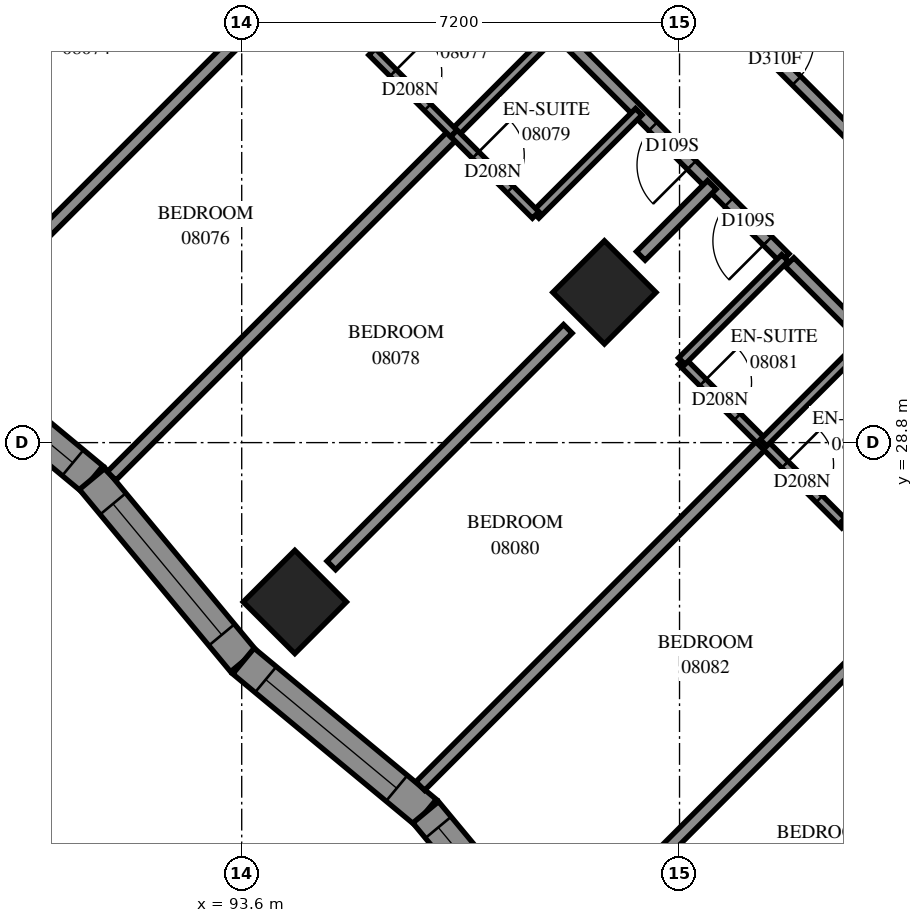
"""IFC4 building model, lengths in metres.
Left out: names, types, materials, properties, quantities, classifications, styles, units other than length and angle.
Written with IfcOpenShell. Run it as: python <this file> out.ifc"""

import sys

from ifc_helpers import new_model, si_unit, direction, frame, frame_2d, origin, origin_2d, place, context, subcontext, project, spatial, polyline, rectangle, outline, extrude, element, fill, save


model = new_model("IFC4")
c1 = context("Model", 3, precision=1e-05, world=origin(), true_north=direction((0.0, 1.0)))
c2 = subcontext(c1, "Body", "Model", "MODEL_VIEW")
j1 = project(units=[si_unit("LENGTHUNIT", "METRE"), si_unit("PLANEANGLEUNIT", "RADIAN")], contexts=[c1])
p1 = place(None, origin())
s1 = spatial("IfcSite", under=j1, at=p1, CompositionType="ELEMENT")
p2 = place(p1, origin())
s2 = spatial("IfcBuilding", under=s1, at=p2, CompositionType="ELEMENT")
p3 = place(p2, frame((0.0, 0.0, 33.8)))
s3 = spatial("IfcBuildingStorey", under=s2, at=p3, CompositionType="ELEMENT", Elevation=33.8)
for number, where, z_axis, x_axis in (
    (1, (99.565, 31.271, 0.0), (0.0, 0.0, 1.0), (0.707, -0.707, 0.0)),
    (2, (94.474, 26.18, 0.0), (0.0, 0.0, 1.0), (0.707, -0.707, 0.0)),
):
    element("IfcColumn", number, at=place(p3, frame(where, z_axis=z_axis, x_axis=x_axis)), inside=s3, PredefinedType="COLUMN", context=c2, shape_type="SweptSolid", body=[
        extrude(rectangle(XDim=1.2, YDim=1.2, at=origin_2d()), origin(), (0.0, 0.0, 1.0), 3.1),
    ])
p4 = place(p3, frame((88.145, 30.691, 0.0), z_axis=(0.0, 0.0, 1.0), x_axis=(0.7696065296, -0.6385184333, 0.0)))
e3 = element("IfcWall", 3, at=p4, inside=s3, PredefinedType="SOLIDWALL", context=c2, shape_type="SweptSolid", body=[
    extrude(outline(polyline([(-0.026, -0.275), (3.869, -0.275), (3.92, 0.275), (0.026, 0.275), (-0.026, -0.275)])), origin(), (0.0, 0.0, 1.0), 3.1),
])
p5 = place(p4, frame((0.681, 0.0, 0.5)))
e4 = element("IfcOpeningElement", 4, at=p5, cuts=e3, PredefinedType="OPENING", context=c2, shape_type="SweptSolid", body=[
    extrude(rectangle(XDim=2.8, YDim=2.45, at=frame_2d((1.4, 1.225))), frame((0.0, 0.285, 0.0), z_axis=(0.0, -1.0, 0.0), x_axis=(1.0, 0.0, 0.0)), (0.0, 0.0, 1.0), 0.57),
])
p6 = place(p3, frame((91.142, 28.205, 0.0), z_axis=(0.0, 0.0, 1.0), x_axis=(0.6385184333, -0.7696065296, 0.0)))
e5 = element("IfcWall", 5, at=p6, inside=s3, PredefinedType="SOLIDWALL", context=c2, shape_type="SweptSolid", body=[
    extrude(outline(polyline([(0.026, -0.275), (3.92, -0.275), (3.869, 0.275), (-0.026, 0.275), (0.026, -0.275)])), origin(), (0.0, 0.0, 1.0), 3.1),
])
p7 = place(p6, frame((0.534, 0.0, 0.5)))
e6 = element("IfcOpeningElement", 6, at=p7, cuts=e5, PredefinedType="OPENING", context=c2, shape_type="SweptSolid", body=[
    extrude(rectangle(XDim=2.8, YDim=2.45, at=frame_2d((1.4, 1.225))), frame((0.0, 0.285, 0.0), z_axis=(0.0, -1.0, 0.0), x_axis=(1.0, 0.0, 0.0)), (0.0, 0.0, 1.0), 0.57),
])
p8 = place(p3, frame((93.629, 25.207, 0.0), z_axis=(0.0, 0.0, 1.0), x_axis=(0.7696065296, -0.6385184333, 0.0)))
e7 = element("IfcWall", 7, at=p8, inside=s3, PredefinedType="SOLIDWALL", context=c2, shape_type="SweptSolid", body=[
    extrude(outline(polyline([(-0.026, -0.275), (3.869, -0.275), (3.92, 0.275), (0.026, 0.275), (-0.026, -0.275)])), origin(), (0.0, 0.0, 1.0), 3.1),
])
p9 = place(p8, frame((0.475, 0.0, 0.5)))
e8 = element("IfcOpeningElement", 8, at=p9, cuts=e7, PredefinedType="OPENING", context=c2, shape_type="SweptSolid", body=[
    extrude(rectangle(XDim=2.8, YDim=2.45, at=frame_2d((1.4, 1.225))), frame((0.0, 0.285, 0.0), z_axis=(0.0, -1.0, 0.0), x_axis=(1.0, 0.0, 0.0)), (0.0, 0.0, 1.0), 0.57),
])
p10 = place(p3, frame((96.626, 22.721, 0.0), z_axis=(0.0, 0.0, 1.0), x_axis=(0.6385032238, -0.7696191482, 0.0)))
e9 = element("IfcWall", 9, at=p10, inside=s3, PredefinedType="SOLIDWALL", context=c2, shape_type="SweptSolid", body=[
    extrude(outline(polyline([(0.026, -0.275), (3.92, -0.275), (3.869, 0.275), (-0.026, 0.275), (0.026, -0.275)])), origin(), (0.0, 0.0, 1.0), 3.1),
])
p11 = place(p10, frame((0.323, 0.0, 0.5)))
e10 = element("IfcOpeningElement", 10, at=p11, cuts=e9, PredefinedType="OPENING", context=c2, shape_type="SweptSolid", body=[
    extrude(rectangle(XDim=2.8, YDim=2.45, at=frame_2d((1.4, 1.225))), frame((0.0, 0.285, 0.0), z_axis=(0.0, -1.0, 0.0), x_axis=(1.0, 0.0, 0.0)), (0.0, 0.0, 1.0), 0.57),
])
p12 = place(p3, frame((94.895, 42.581, 0.0), z_axis=(0.0, 0.0, 1.0), x_axis=(0.7071067812, -0.7071067812, 0.0)))
e11 = element("IfcWall", 11, at=p12, inside=s3, PredefinedType="PARTITIONING", context=c2, shape_type="SweptSolid", body=[
    extrude(rectangle(XDim=14.9, YDim=0.2, at=frame_2d((7.45, 0.0))), origin(), (0.0, 0.0, 1.0), 3.1),
])
p13 = place(p12, frame((2.8, 0.0, 0.0)))
e12 = element("IfcOpeningElement", 12, at=p13, cuts=e11, PredefinedType="OPENING", context=c2, shape_type="SweptSolid", body=[
    extrude(rectangle(XDim=0.9, YDim=2.1, at=frame_2d((0.45, 1.05))), frame((0.0, 0.11, 0.0), z_axis=(0.0, -1.0, 0.0), x_axis=(1.0, 0.0, 0.0)), (0.0, 0.0, 1.0), 0.22),
])
p14 = place(p12, frame((4.348, 0.0, 0.0)))
e13 = element("IfcOpeningElement", 13, at=p14, cuts=e11, PredefinedType="OPENING", context=c2, shape_type="SweptSolid", body=[
    extrude(rectangle(XDim=0.9, YDim=2.1, at=frame_2d((0.45, 1.05))), frame((0.0, 0.11, 0.0), z_axis=(0.0, -1.0, 0.0), x_axis=(1.0, 0.0, 0.0)), (0.0, 0.0, 1.0), 0.22),
])
p15 = place(p12, frame((10.073, 0.0, 0.0)))
e14 = element("IfcOpeningElement", 14, at=p15, cuts=e11, PredefinedType="OPENING", context=c2, shape_type="SweptSolid", body=[
    extrude(rectangle(XDim=1.0, YDim=2.1, at=frame_2d((0.5, 1.05))), frame((0.0, 0.11, 0.0), z_axis=(0.0, -1.0, 0.0), x_axis=(1.0, 0.0, 0.0)), (0.0, 0.0, 1.0), 0.22),
])
p16 = place(p3, frame((102.609, 31.769, 0.0), z_axis=(0.0, 0.0, 1.0), x_axis=(0.7071067812, -0.7071067812, 0.0)))
e15 = element("IfcWall", 15, at=p16, inside=s3, PredefinedType="PARTITIONING", context=c2, shape_type="SweptSolid", body=[
    extrude(rectangle(XDim=10.723, YDim=0.2, at=frame_2d((5.361, 0.0))), origin(), (0.0, 0.0, 1.0), 3.1),
])
p17 = place(p16, frame((4.15, 0.0, 0.0)))
e16 = element("IfcOpeningElement", 16, at=p17, cuts=e15, PredefinedType="OPENING", context=c2, shape_type="SweptSolid", body=[
    extrude(rectangle(XDim=0.9, YDim=2.1, at=frame_2d((0.45, 1.05))), frame((0.0, 0.11, 0.0), z_axis=(0.0, -1.0, 0.0), x_axis=(1.0, 0.0, 0.0)), (0.0, 0.0, 1.0), 0.22),
])
p18 = place(p16, frame((5.8, 0.0, 0.0)))
e17 = element("IfcOpeningElement", 17, at=p18, cuts=e15, PredefinedType="OPENING", context=c2, shape_type="SweptSolid", body=[
    extrude(rectangle(XDim=0.9, YDim=2.1, at=frame_2d((0.45, 1.05))), frame((0.0, 0.11, 0.0), z_axis=(0.0, -1.0, 0.0), x_axis=(1.0, 0.0, 0.0)), (0.0, 0.0, 1.0), 0.22),
])
p19 = place(p3, frame((86.838, 34.522, 0.0), z_axis=(0.0, 0.0, 1.0), x_axis=(0.7072154749, 0.7069980708, 0.0)))
e18 = element("IfcWall", 18, at=p19, inside=s3, PredefinedType="PARTITIONING", context=c2, shape_type="SweptSolid", body=[
    extrude(rectangle(XDim=9.2, YDim=0.2, at=frame_2d((4.6, 0.0))), origin(), (0.0, 0.0, 1.0), 3.1),
])
p20 = place(p3, frame((101.587, 18.028, 0.0), z_axis=(0.0, 0.0, 1.0), x_axis=(0.7072374716, 0.7069760666, 0.0)))
e19 = element("IfcWall", 19, at=p20, inside=s3, PredefinedType="PARTITIONING", context=c2, shape_type="SweptSolid", body=[
    extrude(rectangle(XDim=8.034, YDim=0.2, at=frame_2d((4.017, 0.0))), origin(), (0.0, 0.0, 1.0), 3.1),
])
p21 = place(p3, frame((86.332, 33.307, 0.0), z_axis=(0.0, 0.0, 1.0), x_axis=(0.7069820292, 0.7072315112, 0.0)))
e20 = element("IfcWall", 20, at=p21, inside=s3, PredefinedType="PARTITIONING", context=c2, shape_type="SweptSolid", body=[
    extrude(rectangle(XDim=8.017, YDim=0.2, at=frame_2d((4.008, 0.0))), origin(), (0.0, 0.0, 1.0), 3.1),
])
p22 = place(p3, frame((96.536, 23.152, 0.0), z_axis=(0.0, 0.0, 1.0), x_axis=(0.7071067812, 0.7071067812, 0.0)))
e21 = element("IfcWall", 21, at=p22, inside=s3, PredefinedType="PARTITIONING", context=c2, shape_type="SweptSolid", body=[
    extrude(rectangle(XDim=7.983, YDim=0.2, at=frame_2d((3.991, 0.0))), origin(), (0.0, 0.0, 1.0), 3.1),
])
p23 = place(p3, frame((91.46, 28.252, 0.0), z_axis=(0.0, 0.0, 1.0), x_axis=(0.7072323194, 0.7069812206, 0.0)))
e22 = element("IfcWall", 22, at=p23, inside=s3, PredefinedType="PARTITIONING", context=c2, shape_type="SweptSolid", body=[
    extrude(rectangle(XDim=7.965, YDim=0.2, at=frame_2d((3.982, 0.0))), origin(), (0.0, 0.0, 1.0), 3.1),
])
p24 = place(p3, frame((102.531, 31.833, 0.0), z_axis=(0.0, 0.0, 1.0), x_axis=(-0.7070095491, 0.7072039999, 0.0)))
e23 = element("IfcWall", 23, at=p24, inside=s3, PredefinedType="PARTITIONING", context=c2, shape_type="SweptSolid", body=[
    extrude(rectangle(XDim=7.2, YDim=0.2, at=frame_2d((3.6, 0.0))), origin(), (0.0, 0.0, 1.0), 3.1),
])
p25 = place(p24, frame((2.165, 0.0, 0.0)))
e24 = element("IfcOpeningElement", 24, at=p25, cuts=e23, PredefinedType="OPENING", context=c2, shape_type="SweptSolid", body=[
    extrude(rectangle(XDim=0.9, YDim=2.1, at=frame_2d((0.45, 1.05))), frame((0.0, 0.11, 0.0), z_axis=(0.0, -1.0, 0.0), x_axis=(1.0, 0.0, 0.0)), (0.0, 0.0, 1.0), 0.22),
])
p26 = place(p24, frame((0.4, 0.0, 0.0)))
e25 = element("IfcOpeningElement", 25, at=p26, cuts=e23, PredefinedType="OPENING", context=c2, shape_type="SweptSolid", body=[
    extrude(rectangle(XDim=0.9, YDim=2.1, at=frame_2d((0.45, 1.05))), frame((0.0, 0.11, 0.0), z_axis=(0.0, -1.0, 0.0), x_axis=(1.0, 0.0, 0.0)), (0.0, 0.0, 1.0), 0.22),
])
for number, where, z_axis, x_axis in (
    (26, (89.981, 31.871, 0.0), (0.0, 0.0, 1.0), (0.707, 0.707, 0.0)),
    (27, (100.163, 21.689, 0.0), (0.0, 0.0, 1.0), (0.707, 0.707, 0.0)),
):
    element("IfcWall", number, at=place(p3, frame(where, z_axis=z_axis, x_axis=x_axis)), inside=s3, PredefinedType="PARTITIONING", context=c2, shape_type="SweptSolid", body=[
        extrude(rectangle(XDim=5.504, YDim=0.2, at=frame_2d((2.752, 0.0))), origin(), (0.0, 0.0, 1.0), 3.1),
    ])
p27 = place(p3, frame((95.073, 26.781, 0.0), z_axis=(0.0, 0.0, 1.0), x_axis=(0.7071067812, 0.7071067812, 0.0)))
e28 = element("IfcWall", 28, at=p27, inside=s3, PredefinedType="PARTITIONING", context=c2, shape_type="SweptSolid", body=[
    extrude(rectangle(XDim=5.501, YDim=0.2, at=frame_2d((2.751, 0.0))), origin(), (0.0, 0.0, 1.0), 3.1),
])
p28 = place(p3, frame((100.836, 30.138, 0.0), z_axis=(0.0, 0.0, 1.0), x_axis=(0.7065802685, -0.7076329021, 0.0)))
e29 = element("IfcWall", 29, at=p28, inside=s3, PredefinedType="PARTITIONING", context=c2, shape_type="SweptSolid", body=[
    extrude(rectangle(XDim=3.8, YDim=0.15, at=frame_2d((1.9, 0.0))), origin(), (0.0, 0.0, 1.0), 3.1),
])
p29 = place(p28, frame((0.493, 0.0, 0.0)))
e30 = element("IfcOpeningElement", 30, at=p29, cuts=e29, PredefinedType="OPENING", context=c2, shape_type="SweptSolid", body=[
    extrude(rectangle(XDim=0.8, YDim=2.1, at=frame_2d((0.4, 1.05))), frame((0.0, 0.085, 0.0), z_axis=(0.0, -1.0, 0.0), x_axis=(1.0, 0.0, 0.0)), (0.0, 0.0, 1.0), 0.17),
])
p30 = place(p28, frame((2.402, 0.0, 0.0)))
e31 = element("IfcOpeningElement", 31, at=p30, cuts=e29, PredefinedType="OPENING", context=c2, shape_type="SweptSolid", body=[
    extrude(rectangle(XDim=0.8, YDim=2.1, at=frame_2d((0.4, 1.05))), frame((0.0, 0.085, 0.0), z_axis=(0.0, -1.0, 0.0), x_axis=(1.0, 0.0, 0.0)), (0.0, 0.0, 1.0), 0.17),
])
for number, where, z_axis, x_axis in (
    (32, (95.745, 35.231, 0.0), (0.0, 0.0, 1.0), (0.707, 0.707, 0.0)),
    (33, (103.523, 27.453, 0.0), (0.0, 0.0, 1.0), (0.707, 0.707, 0.0)),
):
    element("IfcWall", number, at=place(p3, frame(where, z_axis=z_axis, x_axis=x_axis)), inside=s3, PredefinedType="PARTITIONING", context=c2, shape_type="SweptSolid", body=[
        extrude(rectangle(XDim=2.401, YDim=0.15, at=frame_2d((1.201, 0.0))), origin(), (0.0, 0.0, 1.0), 3.1),
    ])
p31 = place(p3, frame((97.092, 33.884, 0.0), z_axis=(0.0, 0.0, 1.0), x_axis=(0.706689978, 0.7075233388, 0.0)))
e34 = element("IfcWall", 34, at=p31, inside=s3, PredefinedType="PARTITIONING", context=c2, shape_type="SweptSolid", body=[
    extrude(rectangle(XDim=2.4, YDim=0.15, at=frame_2d((1.2, 0.0))), origin(), (0.0, 0.0, 1.0), 3.1),
])
for number, where, z_axis, x_axis in (
    (35, (100.837, 30.141, 0.0), (0.0, 0.0, 1.0), (0.707, 0.707, 0.0)),
    (36, (98.433, 32.545, 0.0), (0.0, 0.0, 1.0), (0.707, 0.707, 0.0)),
    (37, (102.181, 28.797, 0.0), (0.0, 0.0, 1.0), (0.707, 0.707, 0.0)),
):
    element("IfcWall", number, at=place(p3, frame(where, z_axis=z_axis, x_axis=x_axis)), inside=s3, PredefinedType="PARTITIONING", context=c2, shape_type="SweptSolid", body=[
        extrude(rectangle(XDim=2.398, YDim=0.15, at=frame_2d((1.199, 0.0))), origin(), (0.0, 0.0, 1.0), 3.1),
    ])
p32 = place(p3, frame((95.743, 35.227, 0.0), z_axis=(0.0, 0.0, 1.0), x_axis=(0.7071067812, -0.7071067812, 0.0)))
e38 = element("IfcWall", 38, at=p32, inside=s3, PredefinedType="PARTITIONING", context=c2, shape_type="SweptSolid", body=[
    extrude(rectangle(XDim=1.901, YDim=0.15, at=frame_2d((0.95, 0.0))), origin(), (0.0, 0.0, 1.0), 3.1),
])
p33 = place(p32, frame((0.491, 0.0, 0.0)))
e39 = element("IfcOpeningElement", 39, at=p33, cuts=e38, PredefinedType="OPENING", context=c2, shape_type="SweptSolid", body=[
    extrude(rectangle(XDim=0.8, YDim=2.1, at=frame_2d((0.4, 1.05))), frame((0.0, 0.085, 0.0), z_axis=(0.0, -1.0, 0.0), x_axis=(1.0, 0.0, 0.0)), (0.0, 0.0, 1.0), 0.17),
])
p34 = place(p3, frame((97.09, 33.886, 0.0), z_axis=(0.0, 0.0, 1.0), x_axis=(0.7076330979, -0.7065800724, 0.0)))
e40 = element("IfcWall", 40, at=p34, inside=s3, PredefinedType="PARTITIONING", context=c2, shape_type="SweptSolid", body=[
    extrude(rectangle(XDim=1.899, YDim=0.15, at=frame_2d((0.95, 0.0))), origin(), (0.0, 0.0, 1.0), 3.1),
])
p35 = place(p34, frame((0.504, 0.0, 0.0)))
e41 = element("IfcOpeningElement", 41, at=p35, cuts=e40, PredefinedType="OPENING", context=c2, shape_type="SweptSolid", body=[
    extrude(rectangle(XDim=0.8, YDim=2.1, at=frame_2d((0.4, 1.05))), frame((0.0, 0.085, 0.0), z_axis=(0.0, -1.0, 0.0), x_axis=(1.0, 0.0, 0.0)), (0.0, 0.0, 1.0), 0.17),
])
p36 = place(p3, frame((100.163, 31.871, 0.0), z_axis=(0.0, 0.0, 1.0), x_axis=(0.7071067812, 0.7071067812, 0.0)))
e42 = element("IfcWall", 42, at=p36, inside=s3, PredefinedType="PARTITIONING", context=c2, shape_type="SweptSolid", body=[
    extrude(rectangle(XDim=1.652, YDim=0.2, at=frame_2d((0.826, 0.0))), origin(), (0.0, 0.0, 1.0), 3.1),
])
p37 = place(p5, origin())
e43 = element("IfcWindow", 43, at=p37, inside=s3, PartitioningType="SINGLE_PANEL", PredefinedType="WINDOW", context=c2, shape_type="SweptSolid", body=[
    extrude(rectangle(XDim=2.8, YDim=2.45, at=frame_2d((1.4, 1.225))), frame((0.0, 0.155, 0.0), z_axis=(0.0, -1.0, 0.0), x_axis=(1.0, 0.0, 0.0)), (0.0, 0.0, 1.0), 0.06),
])
fill(e4, e43)
p38 = place(p7, origin())
e44 = element("IfcWindow", 44, at=p38, inside=s3, PartitioningType="SINGLE_PANEL", PredefinedType="WINDOW", context=c2, shape_type="SweptSolid", body=[
    extrude(rectangle(XDim=2.8, YDim=2.45, at=frame_2d((1.4, 1.225))), frame((0.0, 0.155, 0.0), z_axis=(0.0, -1.0, 0.0), x_axis=(1.0, 0.0, 0.0)), (0.0, 0.0, 1.0), 0.06),
])
fill(e6, e44)
p39 = place(p9, origin())
e45 = element("IfcWindow", 45, at=p39, inside=s3, PartitioningType="SINGLE_PANEL", PredefinedType="WINDOW", context=c2, shape_type="SweptSolid", body=[
    extrude(rectangle(XDim=2.8, YDim=2.45, at=frame_2d((1.4, 1.225))), frame((0.0, 0.155, 0.0), z_axis=(0.0, -1.0, 0.0), x_axis=(1.0, 0.0, 0.0)), (0.0, 0.0, 1.0), 0.06),
])
fill(e8, e45)
p40 = place(p11, origin())
e46 = element("IfcWindow", 46, at=p40, inside=s3, PartitioningType="SINGLE_PANEL", PredefinedType="WINDOW", context=c2, shape_type="SweptSolid", body=[
    extrude(rectangle(XDim=2.8, YDim=2.45, at=frame_2d((1.4, 1.225))), frame((0.0, 0.155, 0.0), z_axis=(0.0, -1.0, 0.0), x_axis=(1.0, 0.0, 0.0)), (0.0, 0.0, 1.0), 0.06),
])
fill(e10, e46)
p41 = place(p15, origin())
e47 = element("IfcDoor", 47, at=p41, inside=s3, OperationType="SINGLE_SWING_RIGHT", PredefinedType="DOOR", context=c2, shape_type="SweptSolid", body=[
    extrude(rectangle(XDim=1.0, YDim=2.1, at=frame_2d((0.5, 1.05))), frame((0.0, 0.025, 0.0), z_axis=(0.0, -1.0, 0.0), x_axis=(1.0, 0.0, 0.0)), (0.0, 0.0, 1.0), 0.05),
])
fill(e14, e47)
p42 = place(p33, origin())
e48 = element("IfcDoor", 48, at=p42, inside=s3, OperationType="SINGLE_SWING_RIGHT", PredefinedType="DOOR", context=c2, shape_type="SweptSolid", body=[
    extrude(rectangle(XDim=0.8, YDim=2.1, at=frame_2d((0.4, 1.05))), frame((0.0, 0.025, 0.0), z_axis=(0.0, -1.0, 0.0), x_axis=(1.0, 0.0, 0.0)), (0.0, 0.0, 1.0), 0.05),
])
fill(e39, e48)
p43 = place(p25, origin())
e49 = element("IfcDoor", 49, at=p43, inside=s3, OperationType="SINGLE_SWING_LEFT", PredefinedType="DOOR", context=c2, shape_type="SweptSolid", body=[
    extrude(rectangle(XDim=0.9, YDim=2.1, at=frame_2d((0.45, 1.05))), frame((0.0, 0.025, 0.0), z_axis=(0.0, -1.0, 0.0), x_axis=(1.0, 0.0, 0.0)), (0.0, 0.0, 1.0), 0.05),
])
fill(e24, e49)
p44 = place(p35, origin())
e50 = element("IfcDoor", 50, at=p44, inside=s3, OperationType="SINGLE_SWING_RIGHT", PredefinedType="DOOR", context=c2, shape_type="SweptSolid", body=[
    extrude(rectangle(XDim=0.8, YDim=2.1, at=frame_2d((0.4, 1.05))), frame((0.0, 0.025, 0.0), z_axis=(0.0, -1.0, 0.0), x_axis=(1.0, 0.0, 0.0)), (0.0, 0.0, 1.0), 0.05),
])
fill(e41, e50)
p45 = place(p26, origin())
e51 = element("IfcDoor", 51, at=p45, inside=s3, OperationType="SINGLE_SWING_RIGHT", PredefinedType="DOOR", context=c2, shape_type="SweptSolid", body=[
    extrude(rectangle(XDim=0.9, YDim=2.1, at=frame_2d((0.45, 1.05))), frame((0.0, 0.025, 0.0), z_axis=(0.0, -1.0, 0.0), x_axis=(1.0, 0.0, 0.0)), (0.0, 0.0, 1.0), 0.05),
])
fill(e25, e51)
p46 = place(p29, origin())
e52 = element("IfcDoor", 52, at=p46, inside=s3, OperationType="SINGLE_SWING_RIGHT", PredefinedType="DOOR", context=c2, shape_type="SweptSolid", body=[
    extrude(rectangle(XDim=0.8, YDim=2.1, at=frame_2d((0.4, 1.05))), frame((0.0, 0.025, 0.0), z_axis=(0.0, -1.0, 0.0), x_axis=(1.0, 0.0, 0.0)), (0.0, 0.0, 1.0), 0.05),
])
fill(e30, e52)
p47 = place(p30, origin())
e53 = element("IfcDoor", 53, at=p47, inside=s3, OperationType="SINGLE_SWING_RIGHT", PredefinedType="DOOR", context=c2, shape_type="SweptSolid", body=[
    extrude(rectangle(XDim=0.8, YDim=2.1, at=frame_2d((0.4, 1.05))), frame((0.0, 0.025, 0.0), z_axis=(0.0, -1.0, 0.0), x_axis=(1.0, 0.0, 0.0)), (0.0, 0.0, 1.0), 0.05),
])
fill(e31, e53)
save(model, sys.argv[1])
